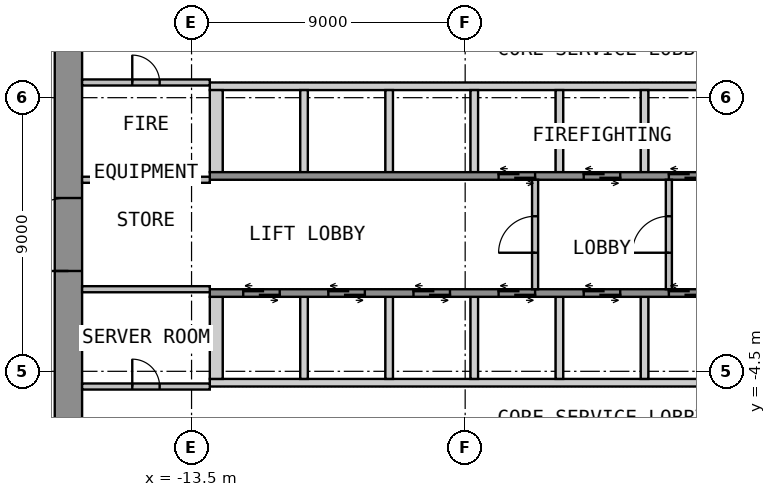
"""IFC4 building model, lengths in metres.
Left out: names, types, materials, properties, quantities, classifications, styles, units other than length and angle.
Written with IfcOpenShell. Run it as: python <this file> out.ifc"""

import sys

from ifc_helpers import new_model, si_unit, direction, frame, frame_2d, origin, place, context, subcontext, project, spatial, polyline, rectangle, outline, extrude, element, fill, save


model = new_model("IFC4")
c1 = context("Model", 3, precision=1e-05, world=origin(), true_north=direction((0.0, 1.0)))
c2 = subcontext(c1, "Body", "Model", "MODEL_VIEW")
j1 = project(units=[si_unit("LENGTHUNIT", "METRE"), si_unit("PLANEANGLEUNIT", "RADIAN")], contexts=[c1])
p1 = place(None, origin())
s1 = spatial("IfcSite", under=j1, at=p1, CompositionType="ELEMENT")
p2 = place(p1, origin())
s2 = spatial("IfcBuilding", under=s1, at=p2, CompositionType="ELEMENT")
p3 = place(p2, frame((0.0, 0.0, 10.8)))
s3 = spatial("IfcBuildingStorey", under=s2, at=p3, CompositionType="ELEMENT", Elevation=10.8)
p4 = place(p3, frame((-17.55, -12.6, 0.0), z_axis=(0.0, 0.0, 1.0), x_axis=(0.0, 1.0, 0.0)))
e1 = element("IfcWall", 1, at=p4, inside=s3, PredefinedType="SHEAR", context=c2, shape_type="SweptSolid", body=[
    extrude(rectangle(XDim=25.2, YDim=0.9, at=frame_2d((12.6, 0.0))), origin(), (0.0, 0.0, 1.0), 4.4),
])
p5 = place(p4, frame((11.4, 0.0, 0.0)))
e2 = element("IfcOpeningElement", 2, at=p5, cuts=e1, PredefinedType="OPENING", context=c2, shape_type="SweptSolid", body=[
    extrude(rectangle(XDim=2.4, YDim=2.1, at=frame_2d((1.2, 1.05))), frame((0.0, 0.46, 0.0), z_axis=(0.0, -1.0, 0.0), x_axis=(1.0, 0.0, 0.0)), (0.0, 0.0, 1.0), 0.92),
])
p6 = place(p3, origin())
e3 = element("IfcWall", 3, at=p6, inside=s3, PredefinedType="SHEAR", context=c2, shape_type="SweptSolid", body=[
    extrude(outline(polyline([(-12.9, 4.75), (12.9, 4.75), (12.9, 5.0), (-12.9, 5.0), (-12.9, 4.75)])), origin(), (0.0, 0.0, 1.0), 4.4),
])
p7 = place(p3, origin())
e4 = element("IfcWall", 4, at=p7, inside=s3, PredefinedType="SHEAR", context=c2, shape_type="SweptSolid", body=[
    extrude(outline(polyline([(-12.9, 2.05), (-12.475, 2.05), (-12.475, 4.75), (-12.9, 4.75), (-12.9, 2.05)])), origin(), (0.0, 0.0, 1.0), 4.4),
])
p8 = place(p3, origin())
e5 = element("IfcWall", 5, at=p8, inside=s3, PredefinedType="SHEAR", context=c2, shape_type="SweptSolid", body=[
    extrude(outline(polyline([(-9.925, 2.05), (-9.675, 2.05), (-9.675, 4.75), (-9.925, 4.75), (-9.925, 2.05)])), origin(), (0.0, 0.0, 1.0), 4.4),
])
p9 = place(p3, origin())
e6 = element("IfcWall", 6, at=p9, inside=s3, PredefinedType="SHEAR", context=c2, shape_type="SweptSolid", body=[
    extrude(outline(polyline([(-7.125, 2.05), (-6.875, 2.05), (-6.875, 4.75), (-7.125, 4.75), (-7.125, 2.05)])), origin(), (0.0, 0.0, 1.0), 4.4),
])
p10 = place(p3, origin())
e7 = element("IfcWall", 7, at=p10, inside=s3, PredefinedType="SHEAR", context=c2, shape_type="SweptSolid", body=[
    extrude(outline(polyline([(-4.325, 2.05), (-4.075, 2.05), (-4.075, 4.75), (-4.325, 4.75), (-4.325, 2.05)])), origin(), (0.0, 0.0, 1.0), 4.4),
])
p11 = place(p3, origin())
e8 = element("IfcWall", 8, at=p11, inside=s3, PredefinedType="SHEAR", context=c2, shape_type="SweptSolid", body=[
    extrude(outline(polyline([(-1.525, 2.05), (-1.275, 2.05), (-1.275, 4.75), (-1.525, 4.75), (-1.525, 2.05)])), origin(), (0.0, 0.0, 1.0), 4.4),
])
p12 = place(p3, origin())
e9 = element("IfcWall", 9, at=p12, inside=s3, PredefinedType="SHEAR", context=c2, shape_type="SweptSolid", body=[
    extrude(outline(polyline([(1.275, 2.05), (1.525, 2.05), (1.525, 4.75), (1.275, 4.75), (1.275, 2.05)])), origin(), (0.0, 0.0, 1.0), 4.4),
])
p13 = place(p3, frame((-12.9, 1.925, 0.0), z_axis=(0.0, 0.0, 1.0), x_axis=(1.0, 0.0, 0.0)))
e10 = element("IfcWall", 10, at=p13, inside=s3, PredefinedType="SHEAR", context=c2, shape_type="SweptSolid", body=[
    extrude(rectangle(XDim=25.8, YDim=0.25, at=frame_2d((12.9, 0.0))), origin(), (0.0, 0.0, 1.0), 4.4),
])
p14 = place(p13, frame((9.5, 0.0, 0.0)))
e11 = element("IfcOpeningElement", 11, at=p14, cuts=e10, PredefinedType="OPENING", context=c2, shape_type="SweptSolid", body=[
    extrude(rectangle(XDim=1.2, YDim=2.1, at=frame_2d((0.6, 1.05))), frame((0.0, 0.135, 0.0), z_axis=(0.0, -1.0, 0.0), x_axis=(1.0, 0.0, 0.0)), (0.0, 0.0, 1.0), 0.27),
])
p15 = place(p13, frame((12.3, 0.0, 0.0)))
e12 = element("IfcOpeningElement", 12, at=p15, cuts=e10, PredefinedType="OPENING", context=c2, shape_type="SweptSolid", body=[
    extrude(rectangle(XDim=1.2, YDim=2.1, at=frame_2d((0.6, 1.05))), frame((0.0, 0.135, 0.0), z_axis=(0.0, -1.0, 0.0), x_axis=(1.0, 0.0, 0.0)), (0.0, 0.0, 1.0), 0.27),
])
p16 = place(p13, frame((15.1, 0.0, 0.0)))
e13 = element("IfcOpeningElement", 13, at=p16, cuts=e10, PredefinedType="OPENING", context=c2, shape_type="SweptSolid", body=[
    extrude(rectangle(XDim=1.2, YDim=2.1, at=frame_2d((0.6, 1.05))), frame((0.0, 0.135, 0.0), z_axis=(0.0, -1.0, 0.0), x_axis=(1.0, 0.0, 0.0)), (0.0, 0.0, 1.0), 0.27),
])
p17 = place(p13, frame((17.9, 0.0, 0.0)))
e14 = element("IfcOpeningElement", 14, at=p17, cuts=e10, PredefinedType="OPENING", context=c2, shape_type="SweptSolid", body=[
    extrude(rectangle(XDim=1.2, YDim=2.1, at=frame_2d((0.6, 1.05))), frame((0.0, 0.135, 0.0), z_axis=(0.0, -1.0, 0.0), x_axis=(1.0, 0.0, 0.0)), (0.0, 0.0, 1.0), 0.27),
])
p18 = place(p13, frame((20.7, 0.0, 0.0)))
e15 = element("IfcOpeningElement", 15, at=p18, cuts=e10, PredefinedType="OPENING", context=c2, shape_type="SweptSolid", body=[
    extrude(rectangle(XDim=1.2, YDim=2.1, at=frame_2d((0.6, 1.05))), frame((0.0, 0.135, 0.0), z_axis=(0.0, -1.0, 0.0), x_axis=(1.0, 0.0, 0.0)), (0.0, 0.0, 1.0), 0.27),
])
p19 = place(p13, frame((23.5, 0.0, 0.0)))
e16 = element("IfcOpeningElement", 16, at=p19, cuts=e10, PredefinedType="OPENING", context=c2, shape_type="SweptSolid", body=[
    extrude(rectangle(XDim=1.2, YDim=2.1, at=frame_2d((0.6, 1.05))), frame((0.0, 0.135, 0.0), z_axis=(0.0, -1.0, 0.0), x_axis=(1.0, 0.0, 0.0)), (0.0, 0.0, 1.0), 0.27),
])
p20 = place(p3, origin())
e17 = element("IfcWall", 17, at=p20, inside=s3, PredefinedType="SHEAR", context=c2, shape_type="SweptSolid", body=[
    extrude(outline(polyline([(-12.9, -5.0), (12.9, -5.0), (12.9, -4.75), (-12.9, -4.75), (-12.9, -5.0)])), origin(), (0.0, 0.0, 1.0), 4.4),
])
p21 = place(p3, origin())
e18 = element("IfcWall", 18, at=p21, inside=s3, PredefinedType="SHEAR", context=c2, shape_type="SweptSolid", body=[
    extrude(outline(polyline([(-12.9, -4.75), (-12.475, -4.75), (-12.475, -2.05), (-12.9, -2.05), (-12.9, -4.75)])), origin(), (0.0, 0.0, 1.0), 4.4),
])
p22 = place(p3, origin())
e19 = element("IfcWall", 19, at=p22, inside=s3, PredefinedType="SHEAR", context=c2, shape_type="SweptSolid", body=[
    extrude(outline(polyline([(-9.925, -4.75), (-9.675, -4.75), (-9.675, -2.05), (-9.925, -2.05), (-9.925, -4.75)])), origin(), (0.0, 0.0, 1.0), 4.4),
])
p23 = place(p3, origin())
e20 = element("IfcWall", 20, at=p23, inside=s3, PredefinedType="SHEAR", context=c2, shape_type="SweptSolid", body=[
    extrude(outline(polyline([(-7.125, -4.75), (-6.875, -4.75), (-6.875, -2.05), (-7.125, -2.05), (-7.125, -4.75)])), origin(), (0.0, 0.0, 1.0), 4.4),
])
p24 = place(p3, origin())
e21 = element("IfcWall", 21, at=p24, inside=s3, PredefinedType="SHEAR", context=c2, shape_type="SweptSolid", body=[
    extrude(outline(polyline([(-4.325, -4.75), (-4.075, -4.75), (-4.075, -2.05), (-4.325, -2.05), (-4.325, -4.75)])), origin(), (0.0, 0.0, 1.0), 4.4),
])
p25 = place(p3, origin())
e22 = element("IfcWall", 22, at=p25, inside=s3, PredefinedType="SHEAR", context=c2, shape_type="SweptSolid", body=[
    extrude(outline(polyline([(-1.525, -4.75), (-1.275, -4.75), (-1.275, -2.05), (-1.525, -2.05), (-1.525, -4.75)])), origin(), (0.0, 0.0, 1.0), 4.4),
])
p26 = place(p3, origin())
e23 = element("IfcWall", 23, at=p26, inside=s3, PredefinedType="SHEAR", context=c2, shape_type="SweptSolid", body=[
    extrude(outline(polyline([(1.275, -4.75), (1.525, -4.75), (1.525, -2.05), (1.275, -2.05), (1.275, -4.75)])), origin(), (0.0, 0.0, 1.0), 4.4),
])
p27 = place(p3, frame((-12.9, -1.925, 0.0), z_axis=(0.0, 0.0, 1.0), x_axis=(1.0, 0.0, 0.0)))
e24 = element("IfcWall", 24, at=p27, inside=s3, PredefinedType="SHEAR", context=c2, shape_type="SweptSolid", body=[
    extrude(rectangle(XDim=25.8, YDim=0.25, at=frame_2d((12.9, 0.0))), origin(), (0.0, 0.0, 1.0), 4.4),
])
p28 = place(p27, frame((1.1, 0.0, 0.0)))
e25 = element("IfcOpeningElement", 25, at=p28, cuts=e24, PredefinedType="OPENING", context=c2, shape_type="SweptSolid", body=[
    extrude(rectangle(XDim=1.2, YDim=2.1, at=frame_2d((0.6, 1.05))), frame((0.0, 0.135, 0.0), z_axis=(0.0, -1.0, 0.0), x_axis=(1.0, 0.0, 0.0)), (0.0, 0.0, 1.0), 0.27),
])
p29 = place(p27, frame((3.9, 0.0, 0.0)))
e26 = element("IfcOpeningElement", 26, at=p29, cuts=e24, PredefinedType="OPENING", context=c2, shape_type="SweptSolid", body=[
    extrude(rectangle(XDim=1.2, YDim=2.1, at=frame_2d((0.6, 1.05))), frame((0.0, 0.135, 0.0), z_axis=(0.0, -1.0, 0.0), x_axis=(1.0, 0.0, 0.0)), (0.0, 0.0, 1.0), 0.27),
])
p30 = place(p27, frame((6.7, 0.0, 0.0)))
e27 = element("IfcOpeningElement", 27, at=p30, cuts=e24, PredefinedType="OPENING", context=c2, shape_type="SweptSolid", body=[
    extrude(rectangle(XDim=1.2, YDim=2.1, at=frame_2d((0.6, 1.05))), frame((0.0, 0.135, 0.0), z_axis=(0.0, -1.0, 0.0), x_axis=(1.0, 0.0, 0.0)), (0.0, 0.0, 1.0), 0.27),
])
p31 = place(p27, frame((9.5, 0.0, 0.0)))
e28 = element("IfcOpeningElement", 28, at=p31, cuts=e24, PredefinedType="OPENING", context=c2, shape_type="SweptSolid", body=[
    extrude(rectangle(XDim=1.2, YDim=2.1, at=frame_2d((0.6, 1.05))), frame((0.0, 0.135, 0.0), z_axis=(0.0, -1.0, 0.0), x_axis=(1.0, 0.0, 0.0)), (0.0, 0.0, 1.0), 0.27),
])
p32 = place(p27, frame((12.3, 0.0, 0.0)))
e29 = element("IfcOpeningElement", 29, at=p32, cuts=e24, PredefinedType="OPENING", context=c2, shape_type="SweptSolid", body=[
    extrude(rectangle(XDim=1.2, YDim=2.1, at=frame_2d((0.6, 1.05))), frame((0.0, 0.135, 0.0), z_axis=(0.0, -1.0, 0.0), x_axis=(1.0, 0.0, 0.0)), (0.0, 0.0, 1.0), 0.27),
])
p33 = place(p27, frame((15.1, 0.0, 0.0)))
e30 = element("IfcOpeningElement", 30, at=p33, cuts=e24, PredefinedType="OPENING", context=c2, shape_type="SweptSolid", body=[
    extrude(rectangle(XDim=1.2, YDim=2.1, at=frame_2d((0.6, 1.05))), frame((0.0, 0.135, 0.0), z_axis=(0.0, -1.0, 0.0), x_axis=(1.0, 0.0, 0.0)), (0.0, 0.0, 1.0), 0.27),
])
p34 = place(p3, frame((-2.2, -1.8, 0.0), z_axis=(0.0, 0.0, 1.0), x_axis=(0.0, 1.0, 0.0)))
e31 = element("IfcWall", 31, at=p34, inside=s3, PredefinedType="PARTITIONING", context=c2, shape_type="SweptSolid", body=[
    extrude(rectangle(XDim=3.6, YDim=0.2, at=frame_2d((1.8, 0.0))), origin(), (0.0, 0.0, 1.0), 4.4),
])
p35 = place(p34, frame((1.2, 0.0, 0.0)))
e32 = element("IfcOpeningElement", 32, at=p35, cuts=e31, PredefinedType="OPENING", context=c2, shape_type="SweptSolid", body=[
    extrude(rectangle(XDim=1.2, YDim=2.1, at=frame_2d((0.6, 1.05))), frame((0.0, 0.11, 0.0), z_axis=(0.0, -1.0, 0.0), x_axis=(1.0, 0.0, 0.0)), (0.0, 0.0, 1.0), 0.22),
])
p36 = place(p3, frame((2.2, -1.8, 0.0), z_axis=(0.0, 0.0, 1.0), x_axis=(0.0, 1.0, 0.0)))
e33 = element("IfcWall", 33, at=p36, inside=s3, PredefinedType="PARTITIONING", context=c2, shape_type="SweptSolid", body=[
    extrude(rectangle(XDim=3.6, YDim=0.2, at=frame_2d((1.8, 0.0))), origin(), (0.0, 0.0, 1.0), 4.4),
])
p37 = place(p36, frame((1.2, 0.0, 0.0)))
e34 = element("IfcOpeningElement", 34, at=p37, cuts=e33, PredefinedType="OPENING", context=c2, shape_type="SweptSolid", body=[
    extrude(rectangle(XDim=1.2, YDim=2.1, at=frame_2d((0.6, 1.05))), frame((0.0, 0.11, 0.0), z_axis=(0.0, -1.0, 0.0), x_axis=(1.0, 0.0, 0.0)), (0.0, 0.0, 1.0), 0.22),
])
p38 = place(p3, frame((-17.1, 5.0, 0.0), z_axis=(0.0, 0.0, 1.0), x_axis=(1.0, 0.0, 0.0)))
e35 = element("IfcWall", 35, at=p38, inside=s3, PredefinedType="PARTITIONING", context=c2, shape_type="SweptSolid", body=[
    extrude(rectangle(XDim=4.2, YDim=0.2, at=frame_2d((2.1, 0.0))), origin(), (0.0, 0.0, 1.0), 4.4),
])
p39 = place(p38, frame((1.65, 0.0, 0.0)))
e36 = element("IfcOpeningElement", 36, at=p39, cuts=e35, PredefinedType="OPENING", context=c2, shape_type="SweptSolid", body=[
    extrude(rectangle(XDim=0.9, YDim=2.1, at=frame_2d((0.45, 1.05))), frame((0.0, 0.11, 0.0), z_axis=(0.0, -1.0, 0.0), x_axis=(1.0, 0.0, 0.0)), (0.0, 0.0, 1.0), 0.22),
])
p40 = place(p3, frame((-17.1, 1.8, 0.0), z_axis=(0.0, 0.0, 1.0), x_axis=(1.0, 0.0, 0.0)))
e37 = element("IfcWall", 37, at=p40, inside=s3, PredefinedType="PARTITIONING", context=c2, shape_type="SweptSolid", body=[
    extrude(rectangle(XDim=4.2, YDim=0.2, at=frame_2d((2.1, 0.0))), origin(), (0.0, 0.0, 1.0), 4.4),
])
p41 = place(p3, frame((-17.1, -5.0, 0.0), z_axis=(0.0, 0.0, 1.0), x_axis=(1.0, 0.0, 0.0)))
e38 = element("IfcWall", 38, at=p41, inside=s3, PredefinedType="PARTITIONING", context=c2, shape_type="SweptSolid", body=[
    extrude(rectangle(XDim=4.2, YDim=0.2, at=frame_2d((2.1, 0.0))), origin(), (0.0, 0.0, 1.0), 4.4),
])
p42 = place(p41, frame((1.65, 0.0, 0.0)))
e39 = element("IfcOpeningElement", 39, at=p42, cuts=e38, PredefinedType="OPENING", context=c2, shape_type="SweptSolid", body=[
    extrude(rectangle(XDim=0.9, YDim=2.1, at=frame_2d((0.45, 1.05))), frame((0.0, 0.11, 0.0), z_axis=(0.0, -1.0, 0.0), x_axis=(1.0, 0.0, 0.0)), (0.0, 0.0, 1.0), 0.22),
])
p43 = place(p3, frame((-17.1, -1.8, 0.0), z_axis=(0.0, 0.0, 1.0), x_axis=(1.0, 0.0, 0.0)))
e40 = element("IfcWall", 40, at=p43, inside=s3, PredefinedType="PARTITIONING", context=c2, shape_type="SweptSolid", body=[
    extrude(rectangle(XDim=4.2, YDim=0.2, at=frame_2d((2.1, 0.0))), origin(), (0.0, 0.0, 1.0), 4.4),
])
p44 = place(p5, origin())
e41 = element("IfcDoor", 41, at=p44, inside=s3, OperationType="DOUBLE_DOOR_DOUBLE_SWING", PredefinedType="DOOR", context=c2, shape_type="SweptSolid", body=[
    extrude(rectangle(XDim=2.4, YDim=2.1, at=frame_2d((1.2, 1.05))), frame((0.0, 0.025, 0.0), z_axis=(0.0, -1.0, 0.0), x_axis=(1.0, 0.0, 0.0)), (0.0, 0.0, 1.0), 0.05),
])
fill(e2, e41)
p45 = place(p14, origin())
e42 = element("IfcDoor", 42, at=p45, inside=s3, OperationType="DOUBLE_DOOR_SLIDING", PredefinedType="DOOR", context=c2, shape_type="SweptSolid", body=[
    extrude(rectangle(XDim=1.2, YDim=2.1, at=frame_2d((0.6, 1.05))), frame((0.0, 0.025, 0.0), z_axis=(0.0, -1.0, 0.0), x_axis=(1.0, 0.0, 0.0)), (0.0, 0.0, 1.0), 0.05),
])
fill(e11, e42)
p46 = place(p15, origin())
e43 = element("IfcDoor", 43, at=p46, inside=s3, OperationType="DOUBLE_DOOR_SLIDING", PredefinedType="DOOR", context=c2, shape_type="SweptSolid", body=[
    extrude(rectangle(XDim=1.2, YDim=2.1, at=frame_2d((0.6, 1.05))), frame((0.0, 0.025, 0.0), z_axis=(0.0, -1.0, 0.0), x_axis=(1.0, 0.0, 0.0)), (0.0, 0.0, 1.0), 0.05),
])
fill(e12, e43)
p47 = place(p16, origin())
e44 = element("IfcDoor", 44, at=p47, inside=s3, OperationType="DOUBLE_DOOR_SLIDING", PredefinedType="DOOR", context=c2, shape_type="SweptSolid", body=[
    extrude(rectangle(XDim=1.2, YDim=2.1, at=frame_2d((0.6, 1.05))), frame((0.0, 0.025, 0.0), z_axis=(0.0, -1.0, 0.0), x_axis=(1.0, 0.0, 0.0)), (0.0, 0.0, 1.0), 0.05),
])
fill(e13, e44)
p48 = place(p28, origin())
e45 = element("IfcDoor", 45, at=p48, inside=s3, OperationType="DOUBLE_DOOR_SLIDING", PredefinedType="DOOR", context=c2, shape_type="SweptSolid", body=[
    extrude(rectangle(XDim=1.2, YDim=2.1, at=frame_2d((0.6, 1.05))), frame((0.0, 0.025, 0.0), z_axis=(0.0, -1.0, 0.0), x_axis=(1.0, 0.0, 0.0)), (0.0, 0.0, 1.0), 0.05),
])
fill(e25, e45)
p49 = place(p29, origin())
e46 = element("IfcDoor", 46, at=p49, inside=s3, OperationType="DOUBLE_DOOR_SLIDING", PredefinedType="DOOR", context=c2, shape_type="SweptSolid", body=[
    extrude(rectangle(XDim=1.2, YDim=2.1, at=frame_2d((0.6, 1.05))), frame((0.0, 0.025, 0.0), z_axis=(0.0, -1.0, 0.0), x_axis=(1.0, 0.0, 0.0)), (0.0, 0.0, 1.0), 0.05),
])
fill(e26, e46)
p50 = place(p30, origin())
e47 = element("IfcDoor", 47, at=p50, inside=s3, OperationType="DOUBLE_DOOR_SLIDING", PredefinedType="DOOR", context=c2, shape_type="SweptSolid", body=[
    extrude(rectangle(XDim=1.2, YDim=2.1, at=frame_2d((0.6, 1.05))), frame((0.0, 0.025, 0.0), z_axis=(0.0, -1.0, 0.0), x_axis=(1.0, 0.0, 0.0)), (0.0, 0.0, 1.0), 0.05),
])
fill(e27, e47)
p51 = place(p31, origin())
e48 = element("IfcDoor", 48, at=p51, inside=s3, OperationType="DOUBLE_DOOR_SLIDING", PredefinedType="DOOR", context=c2, shape_type="SweptSolid", body=[
    extrude(rectangle(XDim=1.2, YDim=2.1, at=frame_2d((0.6, 1.05))), frame((0.0, 0.025, 0.0), z_axis=(0.0, -1.0, 0.0), x_axis=(1.0, 0.0, 0.0)), (0.0, 0.0, 1.0), 0.05),
])
fill(e28, e48)
p52 = place(p32, origin())
e49 = element("IfcDoor", 49, at=p52, inside=s3, OperationType="DOUBLE_DOOR_SLIDING", PredefinedType="DOOR", context=c2, shape_type="SweptSolid", body=[
    extrude(rectangle(XDim=1.2, YDim=2.1, at=frame_2d((0.6, 1.05))), frame((0.0, 0.025, 0.0), z_axis=(0.0, -1.0, 0.0), x_axis=(1.0, 0.0, 0.0)), (0.0, 0.0, 1.0), 0.05),
])
fill(e29, e49)
p53 = place(p33, origin())
e50 = element("IfcDoor", 50, at=p53, inside=s3, OperationType="DOUBLE_DOOR_SLIDING", PredefinedType="DOOR", context=c2, shape_type="SweptSolid", body=[
    extrude(rectangle(XDim=1.2, YDim=2.1, at=frame_2d((0.6, 1.05))), frame((0.0, 0.025, 0.0), z_axis=(0.0, -1.0, 0.0), x_axis=(1.0, 0.0, 0.0)), (0.0, 0.0, 1.0), 0.05),
])
fill(e30, e50)
p54 = place(p35, origin())
e51 = element("IfcDoor", 51, at=p54, inside=s3, OperationType="SINGLE_SWING_LEFT", PredefinedType="DOOR", context=c2, shape_type="SweptSolid", body=[
    extrude(rectangle(XDim=1.2, YDim=2.1, at=frame_2d((0.6, 1.05))), frame((0.0, 0.025, 0.0), z_axis=(0.0, -1.0, 0.0), x_axis=(1.0, 0.0, 0.0)), (0.0, 0.0, 1.0), 0.05),
])
fill(e32, e51)
p55 = place(p37, origin())
e52 = element("IfcDoor", 52, at=p55, inside=s3, OperationType="SINGLE_SWING_LEFT", PredefinedType="DOOR", context=c2, shape_type="SweptSolid", body=[
    extrude(rectangle(XDim=1.2, YDim=2.1, at=frame_2d((0.6, 1.05))), frame((0.0, 0.025, 0.0), z_axis=(0.0, -1.0, 0.0), x_axis=(1.0, 0.0, 0.0)), (0.0, 0.0, 1.0), 0.05),
])
fill(e34, e52)
p56 = place(p39, origin())
e53 = element("IfcDoor", 53, at=p56, inside=s3, OperationType="SINGLE_SWING_LEFT", PredefinedType="DOOR", context=c2, shape_type="SweptSolid", body=[
    extrude(rectangle(XDim=0.9, YDim=2.1, at=frame_2d((0.45, 1.05))), frame((0.0, 0.025, 0.0), z_axis=(0.0, -1.0, 0.0), x_axis=(1.0, 0.0, 0.0)), (0.0, 0.0, 1.0), 0.05),
])
fill(e36, e53)
p57 = place(p42, origin())
e54 = element("IfcDoor", 54, at=p57, inside=s3, OperationType="SINGLE_SWING_LEFT", PredefinedType="DOOR", context=c2, shape_type="SweptSolid", body=[
    extrude(rectangle(XDim=0.9, YDim=2.1, at=frame_2d((0.45, 1.05))), frame((0.0, 0.025, 0.0), z_axis=(0.0, -1.0, 0.0), x_axis=(1.0, 0.0, 0.0)), (0.0, 0.0, 1.0), 0.05),
])
fill(e39, e54)
save(model, sys.argv[1])
